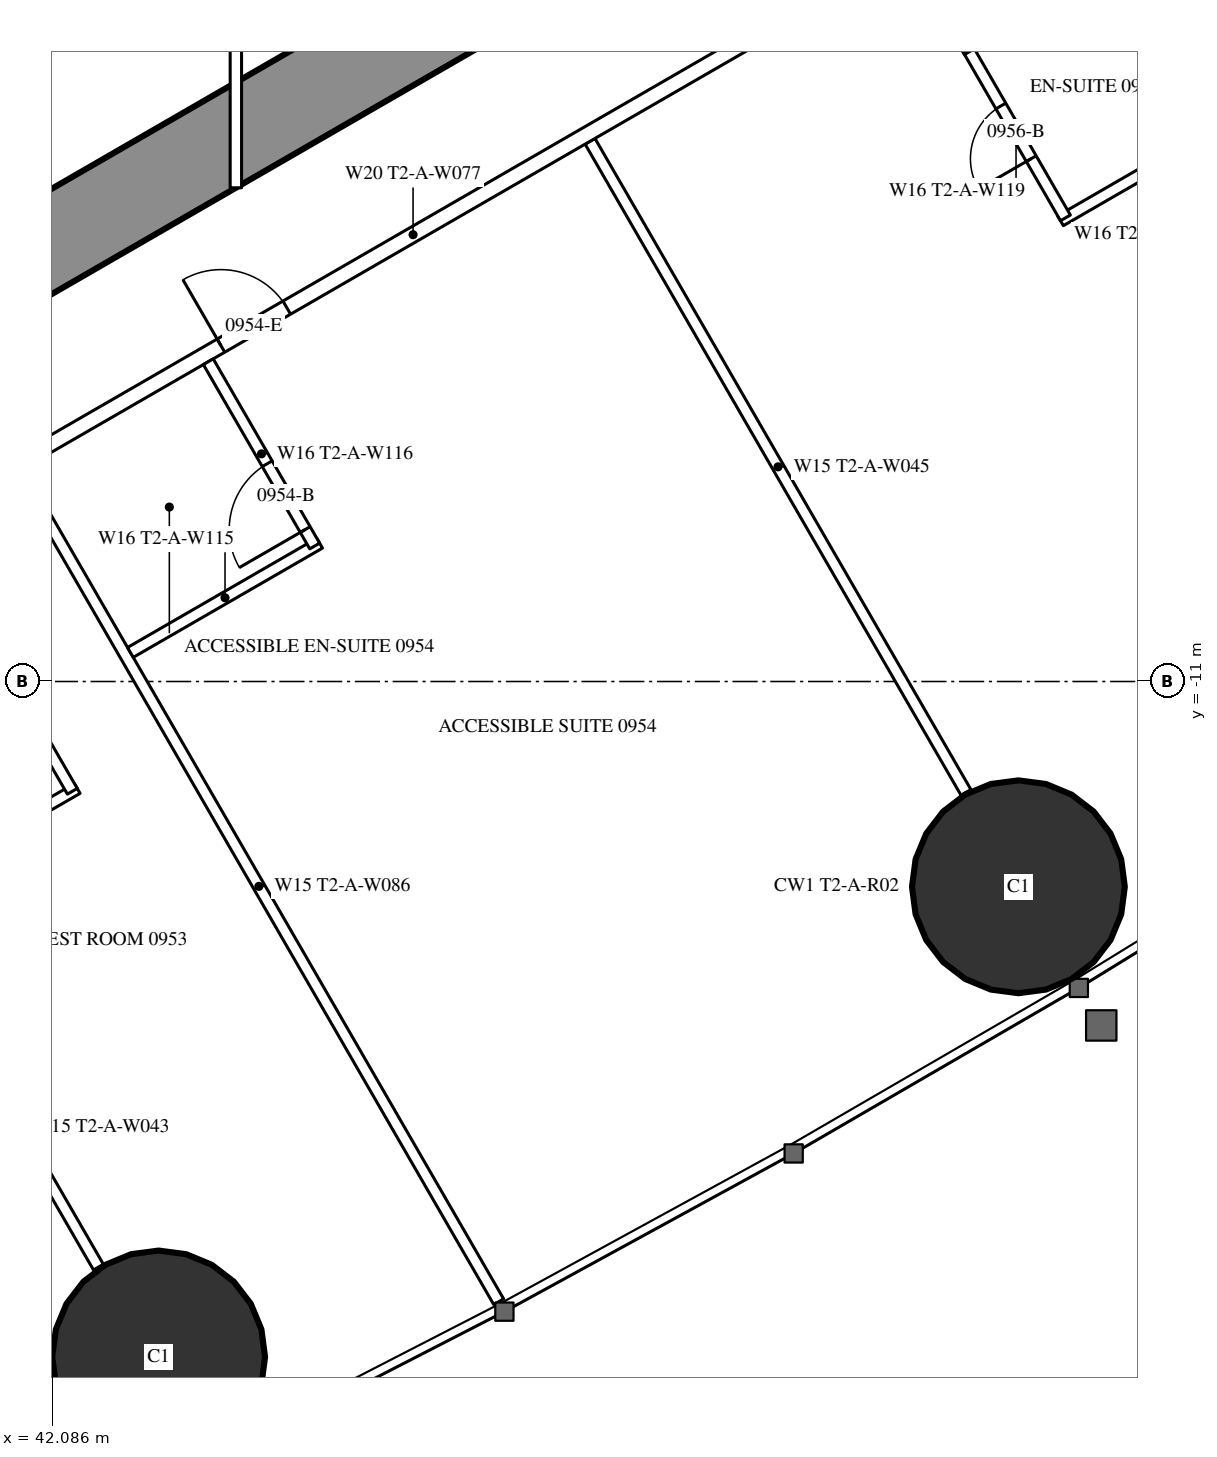
"""IFC4 building model, lengths in metres.
Left out: names, types, materials, properties, quantities, classifications, styles, units other than length and angle.
Written with IfcOpenShell. Run it as: python <this file> out.ifc"""

import sys

from ifc_helpers import new_model, si_unit, direction, frame, frame_2d, origin, origin_2d, place, context, subcontext, project, spatial, rectangle, hollow_circle, extrude, element, fill, save


model = new_model("IFC4")
c1 = context("Model", 3, precision=1e-05, world=origin(), true_north=direction((0.0, 1.0)))
c2 = subcontext(c1, "Body", "Model", "MODEL_VIEW")
j1 = project(units=[si_unit("LENGTHUNIT", "METRE"), si_unit("PLANEANGLEUNIT", "RADIAN")], contexts=[c1])
p1 = place(None, origin())
s1 = spatial("IfcSite", under=j1, at=p1, CompositionType="ELEMENT")
p2 = place(p1, origin())
s2 = spatial("IfcBuilding", under=s1, at=p2, CompositionType="ELEMENT")
p3 = place(p2, frame((0.0, 0.0, 39.0)))
s3 = spatial("IfcBuildingStorey", under=s2, at=p3, CompositionType="ELEMENT", Elevation=39.0)
for number, where, z_axis, x_axis in (
    (1, (43.484, -19.886, 0.0), (0.0, 0.0, 1.0), (1.0, 0.0, 0.0)),
    (2, (54.795, -13.701, 0.0), (0.0, 0.0, 1.0), (1.0, 0.0, 0.0)),
):
    element("IfcColumn", number, at=place(p3, frame(where, z_axis=z_axis, x_axis=x_axis)), inside=s3, PredefinedType="COLUMN", context=c2, shape_type="SweptSolid", body=[
        extrude(hollow_circle(Radius=1.4, WallThickness=0.12, at=origin_2d()), origin(), (0.0, 0.0, 1.0), 3.5),
    ])
p4 = place(p3, frame((27.2, -13.8, 0.0), z_axis=(0.0, 0.0, 1.0), x_axis=(0.866027159892, 0.499996958321, 0.0)))
e3 = element("IfcWall", 3, at=p4, inside=s3, PredefinedType="SHEAR", context=c2, shape_type="SweptSolid", body=[
    extrude(rectangle(XDim=27.947, YDim=1.2, at=frame_2d((13.973, 0.0))), origin(), (0.0, 0.0, 1.0), 3.5),
])
p5 = place(p4, frame((4.6, 0.0, 0.0)))
e4 = element("IfcOpeningElement", 4, at=p5, cuts=e3, PredefinedType="OPENING", context=c2, shape_type="SweptSolid", body=[
    extrude(rectangle(XDim=1.0, YDim=2.2, at=frame_2d((0.5, 1.1))), frame((0.0, 0.61, 0.0), z_axis=(0.0, -1.0, 0.0), x_axis=(1.0, 0.0, 0.0)), (0.0, 0.0, 1.0), 1.22),
])
p6 = place(p4, frame((13.395, 0.0, 0.0)))
e5 = element("IfcOpeningElement", 5, at=p6, cuts=e3, PredefinedType="OPENING", context=c2, shape_type="SweptSolid", body=[
    extrude(rectangle(XDim=1.8, YDim=2.2, at=frame_2d((0.9, 1.1))), frame((0.0, 0.61, 0.0), z_axis=(0.0, -1.0, 0.0), x_axis=(1.0, 0.0, 0.0)), (0.0, 0.0, 1.0), 1.22),
])
p7 = place(p3, frame((41.647, -8.23, 0.0), z_axis=(0.0, 0.0, 1.0), x_axis=(0.49998590462, -0.866033541603, 0.0)))
e6 = element("IfcWall", 6, at=p7, inside=s3, PredefinedType="PARTITIONING", context=c2, shape_type="SweptSolid", body=[
    extrude(rectangle(XDim=12.621, YDim=0.15, at=frame_2d((6.311, 0.0))), origin(), (0.0, 0.0, 1.0), 3.25),
])
p8 = place(p3, frame((49.159, -3.893, 0.0), z_axis=(0.0, 0.0, 1.0), x_axis=(0.499998773722, -0.866026111775, 0.0)))
e7 = element("IfcWall", 7, at=p8, inside=s3, PredefinedType="PARTITIONING", context=c2, shape_type="SweptSolid", body=[
    extrude(rectangle(XDim=9.892, YDim=0.15, at=frame_2d((4.946, 0.0))), origin(), (0.0, 0.0, 1.0), 2.25),
])
p9 = place(p3, frame((40.57, -15.03, 0.0), z_axis=(0.0, 0.0, 1.0), x_axis=(0.500012993597, -0.866017901798, 0.0)))
e8 = element("IfcWall", 8, at=p9, inside=s3, PredefinedType="PARTITIONING", context=c2, shape_type="SweptSolid", body=[
    extrude(rectangle(XDim=4.243, YDim=0.15, at=frame_2d((2.122, 0.0))), origin(), (0.0, 0.0, 1.0), 3.25),
])
p10 = place(p3, frame((37.96, -10.243, 0.0), z_axis=(0.0, 0.0, 1.0), x_axis=(0.866026429433, 0.499998223521, 0.0)))
e9 = element("IfcWall", 9, at=p10, inside=s3, PredefinedType="PARTITIONING", context=c2, shape_type="SweptSolid", body=[
    extrude(rectangle(XDim=20.487, YDim=0.2, at=frame_2d((10.243, 0.0))), origin(), (0.0, 0.0, 1.0), 3.25),
])
p11 = place(p10, frame((7.325, 0.0, 0.0)))
e10 = element("IfcOpeningElement", 10, at=p11, cuts=e9, PredefinedType="OPENING", context=c2, shape_type="SweptSolid", body=[
    extrude(rectangle(XDim=1.0, YDim=2.2, at=frame_2d((0.5, 1.1))), frame((0.0, 0.11, 0.0), z_axis=(0.0, -1.0, 0.0), x_axis=(1.0, 0.0, 0.0)), (0.0, 0.0, 1.0), 0.22),
])
p12 = place(p10, frame((18.937, 0.0, 0.0)))
e11 = element("IfcOpeningElement", 11, at=p12, cuts=e9, PredefinedType="OPENING", context=c2, shape_type="SweptSolid", body=[
    extrude(rectangle(XDim=0.95, YDim=2.2, at=frame_2d((0.475, 1.1))), frame((0.0, 0.11, 0.0), z_axis=(0.0, -1.0, 0.0), x_axis=(1.0, 0.0, 0.0)), (0.0, 0.0, 1.0), 0.22),
])
p13 = place(p10, frame((0.6, 0.0, 0.0)))
e12 = element("IfcOpeningElement", 12, at=p13, cuts=e9, PredefinedType="OPENING", context=c2, shape_type="SweptSolid", body=[
    extrude(rectangle(XDim=0.95, YDim=2.2, at=frame_2d((0.475, 1.1))), frame((0.0, 0.11, 0.0), z_axis=(0.0, -1.0, 0.0), x_axis=(1.0, 0.0, 0.0)), (0.0, 0.0, 1.0), 0.22),
])
p14 = place(p3, frame((43.112, -10.617, 0.0), z_axis=(0.0, 0.0, 1.0), x_axis=(0.866018712932, 0.500011588718, 0.0)))
e13 = element("IfcWall", 13, at=p14, inside=s3, PredefinedType="PARTITIONING", context=c2, shape_type="SweptSolid", body=[
    extrude(rectangle(XDim=2.875, YDim=0.15, at=frame_2d((1.438, 0.0))), origin(), (0.0, 0.0, 1.0), 3.25),
])
p15 = place(p3, frame((44.137, -6.792, 0.0), z_axis=(0.0, 0.0, 1.0), x_axis=(0.49994636267, -0.866056369097, 0.0)))
e14 = element("IfcWall", 14, at=p15, inside=s3, PredefinedType="PARTITIONING", context=c2, shape_type="SweptSolid", body=[
    extrude(rectangle(XDim=2.8, YDim=0.15, at=frame_2d((1.4, 0.0))), origin(), (0.0, 0.0, 1.0), 3.25),
])
p16 = place(p15, frame((1.55, 0.0, 0.0)))
e15 = element("IfcOpeningElement", 15, at=p16, cuts=e14, PredefinedType="OPENING", context=c2, shape_type="SweptSolid", body=[
    extrude(rectangle(XDim=1.0, YDim=2.2, at=frame_2d((0.5, 1.1))), frame((0.0, 0.085, 0.0), z_axis=(0.0, -1.0, 0.0), x_axis=(1.0, 0.0, 0.0)), (0.0, 0.0, 1.0), 0.17),
])
p17 = place(p3, frame((55.349, -4.938, 0.0), z_axis=(0.0, 0.0, 1.0), x_axis=(0.866006523861, 0.500032699561, 0.0)))
e16 = element("IfcWall", 16, at=p17, inside=s3, PredefinedType="PARTITIONING", context=c2, shape_type="SweptSolid", body=[
    extrude(rectangle(XDim=2.475, YDim=0.15, at=frame_2d((1.237, 0.0))), origin(), (0.0, 0.0, 1.0), 3.25),
])
p18 = place(p3, frame((54.114, -2.649, 0.0), z_axis=(0.0, 0.0, 1.0), x_axis=(0.500006934395, -0.866021400173, 0.0)))
e17 = element("IfcWall", 17, at=p18, inside=s3, PredefinedType="PARTITIONING", context=c2, shape_type="SweptSolid", body=[
    extrude(rectangle(XDim=2.6, YDim=0.15, at=frame_2d((1.3, 0.0))), origin(), (0.0, 0.0, 1.0), 3.25),
])
p19 = place(p18, frame((0.9, 0.0, 0.0)))
e18 = element("IfcOpeningElement", 18, at=p19, cuts=e17, PredefinedType="OPENING", context=c2, shape_type="SweptSolid", body=[
    extrude(rectangle(XDim=0.8, YDim=2.2, at=frame_2d((0.4, 1.1))), frame((0.0, 0.085, 0.0), z_axis=(0.0, -1.0, 0.0), x_axis=(1.0, 0.0, 0.0)), (0.0, 0.0, 1.0), 0.17),
])
p20 = place(p3, frame((54.049, -2.687, 0.0), z_axis=(0.0, 0.0, 1.0), x_axis=(0.866006523861, 0.500032699561, 0.0)))
e19 = element("IfcWall", 19, at=p20, inside=s3, PredefinedType="PARTITIONING", context=c2, shape_type="SweptSolid", body=[
    extrude(rectangle(XDim=2.475, YDim=0.15, at=frame_2d((1.237, 0.0))), origin(), (0.0, 0.0, 1.0), 3.25),
])
p21 = place(p3, frame((40.27, -13.644, 0.0), z_axis=(0.0, 0.0, 1.0), x_axis=(0.866031185235, 0.4999899861, 0.0)))
e20 = element("IfcWall", 20, at=p21, inside=s3, PredefinedType="PARTITIONING", context=c2, shape_type="SweptSolid", body=[
    extrude(rectangle(XDim=2.475, YDim=0.15, at=frame_2d((1.238, 0.0))), origin(), (0.0, 0.0, 1.0), 3.25),
])
p22 = place(p3, frame((41.048, -10.193, 0.0), z_axis=(0.0, 0.0, 1.0), x_axis=(0.500047596559, -0.865997922154, 0.0)))
e21 = element("IfcWall", 21, at=p22, inside=s3, PredefinedType="PARTITIONING", context=c2, shape_type="SweptSolid", body=[
    extrude(rectangle(XDim=2.6, YDim=0.15, at=frame_2d((1.3, 0.0))), origin(), (0.0, 0.0, 1.0), 3.25),
])
p23 = place(p22, frame((0.9, 0.0, 0.0)))
e22 = element("IfcOpeningElement", 22, at=p23, cuts=e21, PredefinedType="OPENING", context=c2, shape_type="SweptSolid", body=[
    extrude(rectangle(XDim=0.8, YDim=2.2, at=frame_2d((0.4, 1.1))), frame((0.0, 0.085, 0.0), z_axis=(0.0, -1.0, 0.0), x_axis=(1.0, 0.0, 0.0)), (0.0, 0.0, 1.0), 0.17),
])
p24 = place(p3, frame((44.5, -4.505, 0.0), z_axis=(0.0, 0.0, 1.0), x_axis=(0.0, 1.0, 0.0)))
e23 = element("IfcWall", 23, at=p24, inside=s3, PredefinedType="PARTITIONING", context=c2, shape_type="SweptSolid", body=[
    extrude(rectangle(XDim=9.009, YDim=0.15, at=frame_2d((4.505, 0.0))), origin(), (0.0, 0.0, 1.0), 2.45),
])
p25 = place(p24, frame((4.005, 0.0, 0.0)))
e24 = element("IfcOpeningElement", 24, at=p25, cuts=e23, PredefinedType="OPENING", context=c2, shape_type="SweptSolid", body=[
    extrude(rectangle(XDim=1.0, YDim=2.2, at=frame_2d((0.5, 1.1))), frame((0.0, 0.085, 0.0), z_axis=(0.0, -1.0, 0.0), x_axis=(1.0, 0.0, 0.0)), (0.0, 0.0, 1.0), 0.17),
])
p26 = place(p16, origin())
e25 = element("IfcDoor", 25, at=p26, inside=s3, OperationType="SINGLE_SWING_RIGHT", PredefinedType="DOOR", context=c2, shape_type="SweptSolid", body=[
    extrude(rectangle(XDim=1.0, YDim=2.2, at=frame_2d((0.5, 1.1))), frame((0.0, 0.025, 0.0), z_axis=(0.0, -1.0, 0.0), x_axis=(1.0, 0.0, 0.0)), (0.0, 0.0, 1.0), 0.05),
])
fill(e15, e25)
p27 = place(p11, origin())
e26 = element("IfcDoor", 26, at=p27, inside=s3, OperationType="SINGLE_SWING_LEFT", PredefinedType="DOOR", context=c2, shape_type="SweptSolid", body=[
    extrude(rectangle(XDim=1.0, YDim=2.2, at=frame_2d((0.5, 1.1))), frame((0.0, 0.025, 0.0), z_axis=(0.0, -1.0, 0.0), x_axis=(1.0, 0.0, 0.0)), (0.0, 0.0, 1.0), 0.05),
])
fill(e10, e26)
p28 = place(p19, origin())
e27 = element("IfcDoor", 27, at=p28, inside=s3, OperationType="SINGLE_SWING_RIGHT", PredefinedType="DOOR", context=c2, shape_type="SweptSolid", body=[
    extrude(rectangle(XDim=0.8, YDim=2.2, at=frame_2d((0.4, 1.1))), frame((0.0, 0.025, 0.0), z_axis=(0.0, -1.0, 0.0), x_axis=(1.0, 0.0, 0.0)), (0.0, 0.0, 1.0), 0.05),
])
fill(e18, e27)
save(model, sys.argv[1])
